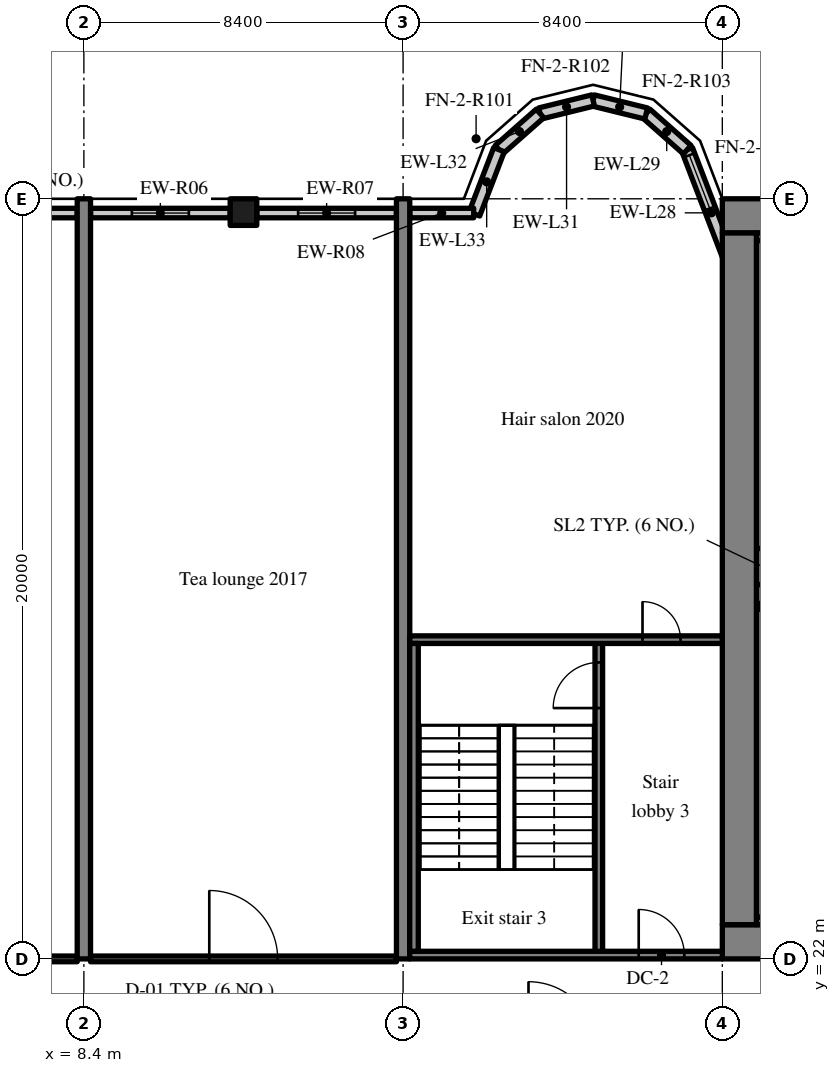
"""IFC4 building model, lengths in metres.
Left out: names, types, materials, properties, quantities, classifications, styles, units other than length and angle.
Written with IfcOpenShell. Run it as: python <this file> out.ifc"""

import sys

from ifc_helpers import new_model, si_unit, direction, frame, frame_2d, origin, origin_2d, place, context, subcontext, project, spatial, rectangle, extrude, source, transform, mapped, element, fill, save


model = new_model("IFC4")
c1 = context("Model", 3, precision=1e-05, world=origin(), true_north=direction((0.0, 1.0)))
c2 = subcontext(c1, "Body", "Model", "MODEL_VIEW")
j1 = project(units=[si_unit("LENGTHUNIT", "METRE"), si_unit("PLANEANGLEUNIT", "RADIAN")], contexts=[c1])
p1 = place(None, origin())
s1 = spatial("IfcSite", under=j1, at=p1, CompositionType="ELEMENT")
p2 = place(p1, origin())
s2 = spatial("IfcBuilding", under=s1, at=p2, CompositionType="ELEMENT")
p3 = place(p2, frame((0.0, 0.0, 86.4)))
s3 = spatial("IfcBuildingStorey", under=s2, at=p3, CompositionType="ELEMENT", Elevation=86.4)
m1 = source(origin(), c2, "Body", "SweptSolid", [
    extrude(rectangle(XDim=50.4, YDim=0.9, at=frame_2d((25.2, 0.0))), origin(), (0.0, 0.0, 1.0), 4.72),
])
p4 = place(p3, frame((25.2, 22.45, 0.0), z_axis=(0.0, 0.0, 1.0), x_axis=(1.0, 0.0, 0.0)))
e1 = element("IfcWall", 1, at=p4, inside=s3, PredefinedType="SHEAR", context=c2, shape_type="MappedRepresentation", body=[
    mapped(m1, transform((0.0, 0.0, 0.0), scale=1.0)),
])
m2 = source(origin(), c2, "Body", "SweptSolid", [
    extrude(rectangle(XDim=1.8, YDim=2.1, at=frame_2d((0.9, 1.05))), frame((0.0, 0.46, 0.0), z_axis=(0.0, -1.0, 0.0), x_axis=(1.0, 0.0, 0.0)), (0.0, 0.0, 1.0), 0.92),
])
p5 = place(p4, frame((15.9, 0.0, 0.0)))
e2 = element("IfcOpeningElement", 2, at=p5, cuts=e1, PredefinedType="OPENING", context=c2, shape_type="MappedRepresentation", body=[
    mapped(m2, transform((0.0, 0.0, 0.0), scale=1.0)),
])
m3 = source(origin(), c2, "Body", "SweptSolid", [
    extrude(rectangle(XDim=1.2, YDim=2.1, at=frame_2d((0.6, 1.05))), frame((0.0, 0.46, 0.0), z_axis=(0.0, -1.0, 0.0), x_axis=(1.0, 0.0, 0.0)), (0.0, 0.0, 1.0), 0.92),
])
p6 = place(p4, frame((26.975, 0.0, 0.0)))
e3 = element("IfcOpeningElement", 3, at=p6, cuts=e1, PredefinedType="OPENING", context=c2, shape_type="MappedRepresentation", body=[
    mapped(m3, transform((0.0, 0.0, 0.0), scale=1.0)),
])
m4 = source(origin(), c2, "Body", "SweptSolid", [
    extrude(rectangle(XDim=0.9, YDim=2.1, at=frame_2d((0.45, 1.05))), frame((0.0, 0.46, 0.0), z_axis=(0.0, -1.0, 0.0), x_axis=(1.0, 0.0, 0.0)), (0.0, 0.0, 1.0), 0.92),
])
p7 = place(p4, frame((34.5, 0.0, 0.0)))
e4 = element("IfcOpeningElement", 4, at=p7, cuts=e1, PredefinedType="OPENING", context=c2, shape_type="MappedRepresentation", body=[
    mapped(m4, transform((0.0, 0.0, 0.0), scale=1.0)),
])
p8 = place(p4, frame((31.5, 0.0, 0.0)))
e5 = element("IfcOpeningElement", 5, at=p8, cuts=e1, PredefinedType="OPENING", context=c2, shape_type="MappedRepresentation", body=[
    mapped(m4, transform((0.0, 0.0, 0.0), scale=1.0)),
])
p9 = place(p4, frame((39.788, 0.0, 0.0)))
e6 = element("IfcOpeningElement", 6, at=p9, cuts=e1, PredefinedType="OPENING", context=c2, shape_type="MappedRepresentation", body=[
    mapped(m4, transform((0.0, 0.0, 0.0), scale=1.0)),
])
p10 = place(p4, frame((36.762, 0.0, 0.0)))
e7 = element("IfcOpeningElement", 7, at=p10, cuts=e1, PredefinedType="OPENING", context=c2, shape_type="MappedRepresentation", body=[
    mapped(m4, transform((0.0, 0.0, 0.0), scale=1.0)),
])
p11 = place(p4, frame((6.45, 0.0, 0.0)))
e8 = element("IfcOpeningElement", 8, at=p11, cuts=e1, PredefinedType="OPENING", context=c2, shape_type="MappedRepresentation", body=[
    mapped(m3, transform((0.0, 0.0, 0.0), scale=1.0)),
])
p12 = place(p4, frame((47.775, 0.0, 0.0)))
e9 = element("IfcOpeningElement", 9, at=p12, cuts=e1, PredefinedType="OPENING", context=c2, shape_type="MappedRepresentation", body=[
    mapped(m3, transform((0.0, 0.0, 0.0), scale=1.0)),
])
p13 = place(p3, frame((25.2, 41.55, 0.0), z_axis=(0.0, 0.0, 1.0), x_axis=(1.0, 0.0, 0.0)))
e10 = element("IfcWall", 10, at=p13, inside=s3, PredefinedType="SHEAR", context=c2, shape_type="MappedRepresentation", body=[
    mapped(m1, transform((0.0, 0.0, 0.0), scale=1.0)),
])
m5 = source(origin(), c2, "Body", "SweptSolid", [
    extrude(rectangle(XDim=18.2, YDim=0.9, at=frame_2d((9.1, 0.0))), origin(), (0.0, 0.0, 1.0), 4.72),
])
p14 = place(p3, frame((25.65, 22.9, 0.0), z_axis=(0.0, 0.0, 1.0), x_axis=(0.0, 1.0, 0.0)))
e11 = element("IfcWall", 11, at=p14, inside=s3, PredefinedType="SHEAR", context=c2, shape_type="MappedRepresentation", body=[
    mapped(m5, transform((0.0, 0.0, 0.0), scale=1.0)),
])
m6 = source(origin(), c2, "Body", "SweptSolid", [
    extrude(rectangle(XDim=7.25, YDim=0.5, at=frame_2d((3.625, 0.0))), origin(), (0.0, 0.0, 1.0), 4.72),
])
p15 = place(p3, frame((26.1, 31.6, 0.0), z_axis=(0.0, 0.0, 1.0), x_axis=(1.0, 0.0, 0.0)))
e12 = element("IfcWall", 12, at=p15, inside=s3, PredefinedType="SHEAR", context=c2, shape_type="MappedRepresentation", body=[
    mapped(m6, transform((0.0, 0.0, 0.0), scale=1.0)),
])
m7 = source(origin(), c2, "Body", "SweptSolid", [
    extrude(rectangle(XDim=1.1, YDim=2.1, at=frame_2d((0.55, 1.05))), frame((0.0, 0.26, 0.0), z_axis=(0.0, -1.0, 0.0), x_axis=(1.0, 0.0, 0.0)), (0.0, 0.0, 1.0), 0.52),
])
p16 = place(p15, frame((5.6, 0.0, 0.0)))
e13 = element("IfcOpeningElement", 13, at=p16, cuts=e12, PredefinedType="OPENING", context=c2, shape_type="MappedRepresentation", body=[
    mapped(m7, transform((0.0, 0.0, 0.0), scale=1.0)),
])
m8 = source(origin(), c2, "Body", "SweptSolid", [
    extrude(rectangle(XDim=20.0, YDim=0.35, at=frame_2d((10.0, 0.0))), origin(), (0.0, 0.0, 1.0), 4.72),
])
for number, where, z_axis, x_axis in (
    (14, (8.4, 22.0, 0.0), (0.0, 0.0, 1.0), (0.0, 1.0, 0.0)),
    (15, (16.8, 22.0, 0.0), (0.0, 0.0, 1.0), (0.0, 1.0, 0.0)),
):
    element("IfcWall", number, at=place(p3, frame(where, z_axis=z_axis, x_axis=x_axis)), inside=s3, PredefinedType="SHEAR", context=c2, shape_type="MappedRepresentation", body=[
        mapped(m8, transform((0.0, 0.0, 0.0), scale=1.0)),
    ])
m9 = source(origin(), c2, "Body", "SweptSolid", [
    extrude(rectangle(XDim=0.7, YDim=0.7, at=origin_2d()), origin(), (0.0, 0.0, 1.0), 4.72),
])
p17 = place(p3, frame((12.6, 41.65, 0.0), z_axis=(0.0, 0.0, 1.0), x_axis=(1.0, 0.0, 0.0)))
e16 = element("IfcColumn", 16, at=p17, inside=s3, PredefinedType="COLUMN", context=c2, shape_type="MappedRepresentation", body=[
    mapped(m9, transform((0.0, 0.0, 0.0), scale=1.0)),
])
m10 = source(origin(), c2, "Body", "SweptSolid", [
    extrude(rectangle(XDim=3.559, YDim=0.3, at=frame_2d((1.78, 0.0))), origin(), (0.0, 0.0, 1.0), 4.72),
])
p18 = place(p3, frame((25.55, 39.969, 0.0), z_axis=(0.0, 0.0, 1.0), x_axis=(-0.35779745313, 0.933799219604, 0.0)))
e17 = element("IfcWall", 17, at=p18, inside=s3, PredefinedType="SOLIDWALL", context=c2, shape_type="MappedRepresentation", body=[
    mapped(m10, transform((0.0, 0.0, 0.0), scale=1.0)),
])
m11 = source(origin(), c2, "Body", "SweptSolid", [
    extrude(rectangle(XDim=1.5, YDim=2.0, at=frame_2d((0.75, 1.0))), frame((0.0, 0.16, 0.0), z_axis=(0.0, -1.0, 0.0), x_axis=(1.0, 0.0, 0.0)), (0.0, 0.0, 1.0), 0.32),
])
p19 = place(p18, frame((1.903, 0.0, 0.9)))
e18 = element("IfcOpeningElement", 18, at=p19, cuts=e17, PredefinedType="OPENING", context=c2, shape_type="MappedRepresentation", body=[
    mapped(m11, transform((0.0, 0.0, 0.0), scale=1.0)),
])
m12 = source(origin(), c2, "Body", "SweptSolid", [
    extrude(rectangle(XDim=1.44, YDim=0.3, at=frame_2d((0.72, 0.0))), origin(), (0.0, 0.0, 1.0), 4.72),
])
p20 = place(p3, frame((24.277, 43.292, 0.0), z_axis=(0.0, 0.0, 1.0), x_axis=(-0.749649827867, 0.661834673902, 0.0)))
e19 = element("IfcWall", 19, at=p20, inside=s3, PredefinedType="SOLIDWALL", context=c2, shape_type="MappedRepresentation", body=[
    mapped(m12, transform((0.0, 0.0, 0.0), scale=1.0)),
])
m13 = source(origin(), c2, "Body", "SweptSolid", [
    extrude(rectangle(XDim=1.438, YDim=0.3, at=frame_2d((0.719, 0.0))), origin(), (0.0, 0.0, 1.0), 4.72),
])
p21 = place(p3, frame((23.197, 44.245, 0.0), z_axis=(0.0, 0.0, 1.0), x_axis=(-0.971152283879, 0.238460146601, 0.0)))
e20 = element("IfcWall", 20, at=p21, inside=s3, PredefinedType="SOLIDWALL", context=c2, shape_type="MappedRepresentation", body=[
    mapped(m13, transform((0.0, 0.0, 0.0), scale=1.0)),
])
m14 = source(origin(), c2, "Body", "SweptSolid", [
    extrude(rectangle(XDim=1.439, YDim=0.3, at=frame_2d((0.719, 0.0))), origin(), (0.0, 0.0, 1.0), 4.72),
])
p22 = place(p3, frame((21.8, 44.588, 0.0), z_axis=(0.0, 0.0, 1.0), x_axis=(-0.971161932466, -0.238420848351, 0.0)))
e21 = element("IfcWall", 21, at=p22, inside=s3, PredefinedType="SOLIDWALL", context=c2, shape_type="MappedRepresentation", body=[
    mapped(m14, transform((0.0, 0.0, 0.0), scale=1.0)),
])
m15 = source(origin(), c2, "Body", "SweptSolid", [
    extrude(rectangle(XDim=1.44, YDim=0.3, at=frame_2d((0.72, 0.0))), origin(), (0.0, 0.0, 1.0), 4.72),
])
p23 = place(p3, frame((20.403, 44.245, 0.0), z_axis=(0.0, 0.0, 1.0), x_axis=(-0.74957555648, -0.661918790432, 0.0)))
e22 = element("IfcWall", 22, at=p23, inside=s3, PredefinedType="SOLIDWALL", context=c2, shape_type="MappedRepresentation", body=[
    mapped(m15, transform((0.0, 0.0, 0.0), scale=1.0)),
])
m16 = source(origin(), c2, "Body", "SweptSolid", [
    extrude(rectangle(XDim=1.812, YDim=0.3, at=frame_2d((0.906, 0.0))), origin(), (0.0, 0.0, 1.0), 4.72),
])
p24 = place(p3, frame((19.323, 43.292, 0.0), z_axis=(0.0, 0.0, 1.0), x_axis=(-0.357877270961, -0.93376863244, 0.0)))
e23 = element("IfcWall", 23, at=p24, inside=s3, PredefinedType="SOLIDWALL", context=c2, shape_type="MappedRepresentation", body=[
    mapped(m16, transform((0.0, 0.0, 0.0), scale=1.0)),
])
m17 = source(origin(), c2, "Body", "SweptSolid", [
    extrude(rectangle(XDim=4.07, YDim=0.25, at=frame_2d((2.035, 0.0))), origin(), (0.0, 0.0, 1.0), 4.02),
])
p25 = place(p3, frame((8.225, 41.625, 0.0), z_axis=(0.0, 0.0, 1.0), x_axis=(-1.0, 0.0, 0.0)))
e24 = element("IfcWall", 24, at=p25, inside=s3, PredefinedType="SOLIDWALL", context=c2, shape_type="MappedRepresentation", body=[
    mapped(m17, transform((0.0, 0.0, 0.0), scale=1.0)),
])
m18 = source(origin(), c2, "Body", "SweptSolid", [
    extrude(rectangle(XDim=1.5, YDim=1.5, at=frame_2d((0.75, 0.75))), frame((0.0, 0.135, 0.0), z_axis=(0.0, -1.0, 0.0), x_axis=(1.0, 0.0, 0.0)), (0.0, 0.0, 1.0), 0.27),
])
p26 = place(p25, frame((1.285, 0.0, 0.9)))
e25 = element("IfcOpeningElement", 25, at=p26, cuts=e24, PredefinedType="OPENING", context=c2, shape_type="MappedRepresentation", body=[
    mapped(m18, transform((0.0, 0.0, 0.0), scale=1.0)),
])
m19 = source(origin(), c2, "Body", "SweptSolid", [
    extrude(rectangle(XDim=3.675, YDim=0.25, at=frame_2d((1.837, 0.0))), origin(), (0.0, 0.0, 1.0), 4.02),
])
p27 = place(p3, frame((12.25, 41.625, 0.0), z_axis=(0.0, 0.0, 1.0), x_axis=(-1.0, 0.0, 0.0)))
e26 = element("IfcWall", 26, at=p27, inside=s3, PredefinedType="SOLIDWALL", context=c2, shape_type="MappedRepresentation", body=[
    mapped(m19, transform((0.0, 0.0, 0.0), scale=1.0)),
])
p28 = place(p27, frame((1.087, 0.0, 0.9)))
e27 = element("IfcOpeningElement", 27, at=p28, cuts=e26, PredefinedType="OPENING", context=c2, shape_type="MappedRepresentation", body=[
    mapped(m18, transform((0.0, 0.0, 0.0), scale=1.0)),
])
p29 = place(p3, frame((16.625, 41.625, 0.0), z_axis=(0.0, 0.0, 1.0), x_axis=(-1.0, 0.0, 0.0)))
e28 = element("IfcWall", 28, at=p29, inside=s3, PredefinedType="SOLIDWALL", context=c2, shape_type="MappedRepresentation", body=[
    mapped(m19, transform((0.0, 0.0, 0.0), scale=1.0)),
])
p30 = place(p29, frame((1.087, 0.0, 0.9)))
e29 = element("IfcOpeningElement", 29, at=p30, cuts=e28, PredefinedType="OPENING", context=c2, shape_type="MappedRepresentation", body=[
    mapped(m18, transform((0.0, 0.0, 0.0), scale=1.0)),
])
m20 = source(origin(), c2, "Body", "SweptSolid", [
    extrude(rectangle(XDim=1.683, YDim=0.25, at=frame_2d((0.841, 0.0))), origin(), (0.0, 0.0, 1.0), 4.02),
])
p31 = place(p3, frame((18.658, 41.625, 0.0), z_axis=(0.0, 0.0, 1.0), x_axis=(-1.0, 0.0, 0.0)))
e30 = element("IfcWall", 30, at=p31, inside=s3, PredefinedType="SOLIDWALL", context=c2, shape_type="MappedRepresentation", body=[
    mapped(m20, transform((0.0, 0.0, 0.0), scale=1.0)),
])
m21 = source(origin(), c2, "Body", "SweptSolid", [
    extrude(rectangle(XDim=8.3, YDim=0.2, at=frame_2d((4.15, 0.0))), origin(), (0.0, 0.0, 1.0), 4.72),
])
p32 = place(p3, frame((21.95, 22.1, 0.0), z_axis=(0.0, 0.0, 1.0), x_axis=(0.0, 1.0, 0.0)))
e31 = element("IfcWall", 31, at=p32, inside=s3, PredefinedType="SOLIDWALL", context=c2, shape_type="MappedRepresentation", body=[
    mapped(m21, transform((0.0, 0.0, 0.0), scale=1.0)),
])
m22 = source(origin(), c2, "Body", "SweptSolid", [
    extrude(rectangle(XDim=1.2, YDim=2.1, at=frame_2d((0.6, 1.05))), frame((0.0, 0.11, 0.0), z_axis=(0.0, -1.0, 0.0), x_axis=(1.0, 0.0, 0.0)), (0.0, 0.0, 1.0), 0.22),
])
p33 = place(p32, frame((6.5, 0.0, 0.0)))
e32 = element("IfcOpeningElement", 32, at=p33, cuts=e31, PredefinedType="OPENING", context=c2, shape_type="MappedRepresentation", body=[
    mapped(m22, transform((0.0, 0.0, 0.0), scale=1.0)),
])
m23 = source(origin(), c2, "Body", "SweptSolid", [
    extrude(rectangle(XDim=8.225, YDim=0.2, at=frame_2d((4.112, 0.0))), origin(), (0.0, 0.0, 1.0), 4.72),
])
p34 = place(p3, frame((16.975, 22.1, 0.0), z_axis=(0.0, 0.0, 1.0), x_axis=(1.0, 0.0, 0.0)))
e33 = element("IfcWall", 33, at=p34, inside=s3, PredefinedType="SOLIDWALL", context=c2, shape_type="MappedRepresentation", body=[
    mapped(m23, transform((0.0, 0.0, 0.0), scale=1.0)),
])
p35 = place(p34, frame((6.025, 0.0, 0.0)))
e34 = element("IfcOpeningElement", 34, at=p35, cuts=e33, PredefinedType="OPENING", context=c2, shape_type="MappedRepresentation", body=[
    mapped(m22, transform((0.0, 0.0, 0.0), scale=1.0)),
])
p36 = place(p3, frame((16.975, 30.4, 0.0), z_axis=(0.0, 0.0, 1.0), x_axis=(1.0, 0.0, 0.0)))
e35 = element("IfcWall", 35, at=p36, inside=s3, PredefinedType="SOLIDWALL", context=c2, shape_type="MappedRepresentation", body=[
    mapped(m23, transform((0.0, 0.0, 0.0), scale=1.0)),
])
m24 = source(origin(), c2, "Body", "SweptSolid", [
    extrude(rectangle(XDim=1.0, YDim=2.1, at=frame_2d((0.5, 1.05))), frame((0.0, 0.11, 0.0), z_axis=(0.0, -1.0, 0.0), x_axis=(1.0, 0.0, 0.0)), (0.0, 0.0, 1.0), 0.22),
])
p37 = place(p36, frame((6.125, 0.0, 0.0)))
e36 = element("IfcOpeningElement", 36, at=p37, cuts=e35, PredefinedType="OPENING", context=c2, shape_type="MappedRepresentation", body=[
    mapped(m24, transform((0.0, 0.0, 0.0), scale=1.0)),
])
m25 = source(origin(), c2, "Body", "SweptSolid", [
    extrude(rectangle(XDim=4.85, YDim=0.2, at=frame_2d((2.425, 0.0))), origin(), (0.0, 0.0, 1.0), 4.72),
])
p38 = place(p3, frame((26.1, 23.0, 0.0), z_axis=(0.0, 0.0, 1.0), x_axis=(1.0, 0.0, 0.0)))
e37 = element("IfcWall", 37, at=p38, inside=s3, PredefinedType="SOLIDWALL", context=c2, shape_type="MappedRepresentation", body=[
    mapped(m25, transform((0.0, 0.0, 0.0), scale=1.0)),
])
m26 = source(origin(), c2, "Body", "SweptSolid", [
    extrude(rectangle(XDim=4.85, YDim=0.15, at=frame_2d((2.425, 0.0))), origin(), (0.0, 0.0, 1.0), 4.72),
])
p39 = place(p3, frame((26.1, 31.275, 0.0), z_axis=(0.0, 0.0, 1.0), x_axis=(1.0, 0.0, 0.0)))
e38 = element("IfcWall", 38, at=p39, inside=s3, PredefinedType="SOLIDWALL", context=c2, shape_type="MappedRepresentation", body=[
    mapped(m26, transform((0.0, 0.0, 0.0), scale=1.0)),
])
m27 = source(origin(), c2, "Body", "SweptSolid", [
    extrude(rectangle(XDim=8.1, YDim=0.2, at=frame_2d((4.05, 0.0))), origin(), (0.0, 0.0, 1.0), 4.72),
])
p40 = place(p3, frame((26.2, 23.1, 0.0), z_axis=(0.0, 0.0, 1.0), x_axis=(0.0, 1.0, 0.0)))
e39 = element("IfcWall", 39, at=p40, inside=s3, PredefinedType="SOLIDWALL", context=c2, shape_type="MappedRepresentation", body=[
    mapped(m27, transform((0.0, 0.0, 0.0), scale=1.0)),
])
m28 = source(origin(), c2, "Body", "SweptSolid", [
    extrude(rectangle(XDim=8.1, YDim=0.225, at=frame_2d((4.05, 0.0))), origin(), (0.0, 0.0, 1.0), 4.72),
])
p41 = place(p3, frame((17.087, 22.2, 0.0), z_axis=(0.0, 0.0, 1.0), x_axis=(0.0, 1.0, 0.0)))
e40 = element("IfcWall", 40, at=p41, inside=s3, PredefinedType="SOLIDWALL", context=c2, shape_type="MappedRepresentation", body=[
    mapped(m28, transform((0.0, 0.0, 0.0), scale=1.0)),
])
p42 = place(p3, frame((26.1, 41.0, 0.0), z_axis=(0.0, 0.0, 1.0), x_axis=(1.0, 0.0, 0.0)))
e41 = element("IfcWall", 41, at=p42, inside=s3, PredefinedType="SOLIDWALL", context=c2, shape_type="MappedRepresentation", body=[
    mapped(m25, transform((0.0, 0.0, 0.0), scale=1.0)),
])
m29 = source(origin(), c2, "Body", "SweptSolid", [
    extrude(rectangle(XDim=4.85, YDim=0.95, at=frame_2d((2.425, 0.0))), origin(), (0.0, 0.0, 1.0), 4.72),
])
p43 = place(p3, frame((26.1, 32.325, 0.0), z_axis=(0.0, 0.0, 1.0), x_axis=(1.0, 0.0, 0.0)))
e42 = element("IfcWall", 42, at=p43, inside=s3, PredefinedType="SOLIDWALL", context=c2, shape_type="MappedRepresentation", body=[
    mapped(m29, transform((0.0, 0.0, 0.0), scale=1.0)),
])
p44 = place(p3, frame((26.2, 32.8, 0.0), z_axis=(0.0, 0.0, 1.0), x_axis=(0.0, 1.0, 0.0)))
e43 = element("IfcWall", 43, at=p44, inside=s3, PredefinedType="SOLIDWALL", context=c2, shape_type="MappedRepresentation", body=[
    mapped(m27, transform((0.0, 0.0, 0.0), scale=1.0)),
])
m30 = source(origin(), c2, "Body", "SweptSolid", [
    extrude(rectangle(XDim=7.875, YDim=0.15, at=frame_2d((3.938, 0.0))), origin(), (0.0, 0.0, 1.0), 4.02),
])
p45 = place(p3, frame((0.35, 22.0, 0.0), z_axis=(0.0, 0.0, 1.0), x_axis=(1.0, 0.0, 0.0)))
e44 = element("IfcWall", 44, at=p45, inside=s3, PredefinedType="PARTITIONING", context=c2, shape_type="MappedRepresentation", body=[
    mapped(m30, transform((0.0, 0.0, 0.0), scale=1.0)),
])
m31 = source(origin(), c2, "Body", "SweptSolid", [
    extrude(rectangle(XDim=1.8, YDim=2.1, at=frame_2d((0.9, 1.05))), frame((0.0, 0.085, 0.0), z_axis=(0.0, -1.0, 0.0), x_axis=(1.0, 0.0, 0.0)), (0.0, 0.0, 1.0), 0.17),
])
p46 = place(p45, frame((3.037, 0.0, 0.0)))
e45 = element("IfcOpeningElement", 45, at=p46, cuts=e44, PredefinedType="OPENING", context=c2, shape_type="MappedRepresentation", body=[
    mapped(m31, transform((0.0, 0.0, 0.0), scale=1.0)),
])
m32 = source(origin(), c2, "Body", "SweptSolid", [
    extrude(rectangle(XDim=8.05, YDim=0.15, at=frame_2d((4.025, 0.0))), origin(), (0.0, 0.0, 1.0), 4.02),
])
p47 = place(p3, frame((8.575, 22.0, 0.0), z_axis=(0.0, 0.0, 1.0), x_axis=(1.0, 0.0, 0.0)))
e46 = element("IfcWall", 46, at=p47, inside=s3, PredefinedType="PARTITIONING", context=c2, shape_type="MappedRepresentation", body=[
    mapped(m32, transform((0.0, 0.0, 0.0), scale=1.0)),
])
p48 = place(p47, frame((3.125, 0.0, 0.0)))
e47 = element("IfcOpeningElement", 47, at=p48, cuts=e46, PredefinedType="OPENING", context=c2, shape_type="MappedRepresentation", body=[
    mapped(m31, transform((0.0, 0.0, 0.0), scale=1.0)),
])
m33 = source(origin(), c2, "Body", "SweptSolid", [
    extrude(rectangle(XDim=1.5, YDim=2.0, at=frame_2d((0.75, 1.0))), frame((0.0, 0.03, 0.0), z_axis=(0.0, -1.0, 0.0), x_axis=(1.0, 0.0, 0.0)), (0.0, 0.0, 1.0), 0.06),
])
p49 = place(p19, origin())
e48 = element("IfcWindow", 48, at=p49, inside=s3, PartitioningType="SINGLE_PANEL", PredefinedType="WINDOW", context=c2, shape_type="MappedRepresentation", body=[
    mapped(m33, transform((0.0, 0.0, 0.0), scale=1.0)),
])
fill(e18, e48)
m34 = source(origin(), c2, "Body", "SweptSolid", [
    extrude(rectangle(XDim=1.5, YDim=1.5, at=frame_2d((0.75, 0.75))), frame((0.0, 0.03, 0.0), z_axis=(0.0, -1.0, 0.0), x_axis=(1.0, 0.0, 0.0)), (0.0, 0.0, 1.0), 0.06),
])
p50 = place(p28, origin())
e49 = element("IfcWindow", 49, at=p50, inside=s3, PartitioningType="SINGLE_PANEL", PredefinedType="WINDOW", context=c2, shape_type="MappedRepresentation", body=[
    mapped(m34, transform((0.0, 0.0, 0.0), scale=1.0)),
])
fill(e27, e49)
p51 = place(p30, origin())
e50 = element("IfcWindow", 50, at=p51, inside=s3, PartitioningType="SINGLE_PANEL", PredefinedType="WINDOW", context=c2, shape_type="MappedRepresentation", body=[
    mapped(m34, transform((0.0, 0.0, 0.0), scale=1.0)),
])
fill(e29, e50)
m35 = source(origin(), c2, "Body", "SweptSolid", [
    extrude(rectangle(XDim=1.2, YDim=2.1, at=frame_2d((0.6, 1.05))), frame((0.0, 0.025, 0.0), z_axis=(0.0, -1.0, 0.0), x_axis=(1.0, 0.0, 0.0)), (0.0, 0.0, 1.0), 0.05),
])
p52 = place(p33, origin())
e51 = element("IfcDoor", 51, at=p52, inside=s3, OperationType="SINGLE_SWING_LEFT", PredefinedType="DOOR", context=c2, shape_type="MappedRepresentation", body=[
    mapped(m35, transform((0.0, 0.0, 0.0), scale=1.0)),
])
fill(e32, e51)
p53 = place(p35, origin())
e52 = element("IfcDoor", 52, at=p53, inside=s3, OperationType="SINGLE_SWING_LEFT", PredefinedType="DOOR", context=c2, shape_type="MappedRepresentation", body=[
    mapped(m35, transform((0.0, 0.0, 0.0), scale=1.0)),
])
fill(e34, e52)
m36 = source(origin(), c2, "Body", "SweptSolid", [
    extrude(rectangle(XDim=1.0, YDim=2.1, at=frame_2d((0.5, 1.05))), frame((0.0, 0.025, 0.0), z_axis=(0.0, -1.0, 0.0), x_axis=(1.0, 0.0, 0.0)), (0.0, 0.0, 1.0), 0.05),
])
p54 = place(p37, origin())
e53 = element("IfcDoor", 53, at=p54, inside=s3, OperationType="SINGLE_SWING_LEFT", PredefinedType="DOOR", context=c2, shape_type="MappedRepresentation", body=[
    mapped(m36, transform((0.0, 0.0, 0.0), scale=1.0)),
])
fill(e36, e53)
m37 = source(origin(), c2, "Body", "SweptSolid", [
    extrude(rectangle(XDim=1.8, YDim=2.1, at=frame_2d((0.9, 1.05))), frame((0.0, 0.025, 0.0), z_axis=(0.0, -1.0, 0.0), x_axis=(1.0, 0.0, 0.0)), (0.0, 0.0, 1.0), 0.05),
])
p55 = place(p48, origin())
e54 = element("IfcDoor", 54, at=p55, inside=s3, OperationType="DOUBLE_DOOR_SINGLE_SWING", PredefinedType="DOOR", context=c2, shape_type="MappedRepresentation", body=[
    mapped(m37, transform((0.0, 0.0, 0.0), scale=1.0)),
])
fill(e47, e54)
save(model, sys.argv[1])
